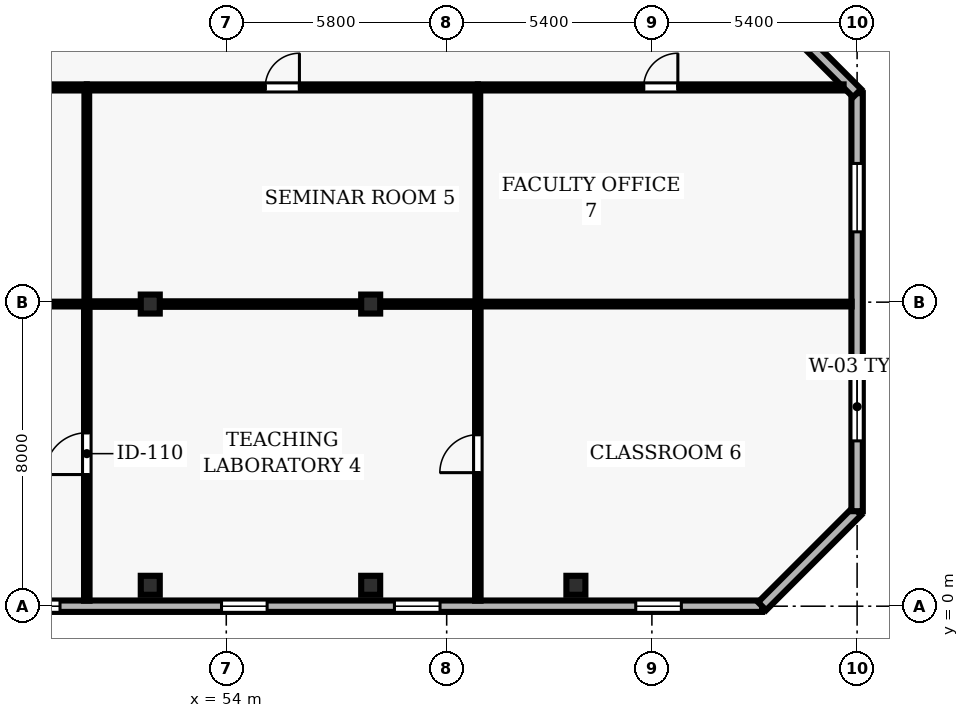
"""IFC4 building model, lengths in metres.
Left out: names, types, materials, properties, quantities, classifications, styles, units other than length and angle.
Written with IfcOpenShell. Run it as: python <this file> out.ifc"""

import sys

from ifc_helpers import new_model, si_unit, direction, frame, frame_2d, origin, origin_2d, place, context, subcontext, project, spatial, rectangle, hollow_rectangle, extrude, element, fill, save


model = new_model("IFC4")
c1 = context("Model", 3, precision=1e-05, world=origin(), true_north=direction((0.0, 1.0)))
c2 = subcontext(c1, "Body", "Model", "MODEL_VIEW")
j1 = project(units=[si_unit("LENGTHUNIT", "METRE"), si_unit("PLANEANGLEUNIT", "RADIAN")], contexts=[c1])
p1 = place(None, origin())
s1 = spatial("IfcSite", under=j1, at=p1, CompositionType="ELEMENT")
p2 = place(p1, origin())
s2 = spatial("IfcBuilding", under=s1, at=p2, CompositionType="ELEMENT")
p3 = place(p2, frame((0.0, 0.0, 103.4)))
s3 = spatial("IfcBuildingStorey", under=s2, at=p3, CompositionType="ELEMENT", Elevation=103.4)
for number, where, z_axis, x_axis in (
    (1, (52.0, 0.55, 0.0), (0.0, 0.0, 1.0), (1.0, 0.0, 0.0)),
    (2, (52.0, 7.95, 0.0), (0.0, 0.0, 1.0), (1.0, 0.0, 0.0)),
    (3, (57.8, 0.55, 0.0), (0.0, 0.0, 1.0), (1.0, 0.0, 0.0)),
    (4, (57.8, 7.95, 0.0), (0.0, 0.0, 1.0), (1.0, 0.0, 0.0)),
    (5, (63.2, 0.55, 0.0), (0.0, 0.0, 1.0), (1.0, 0.0, 0.0)),
):
    element("IfcColumn", number, at=place(p3, frame(where, z_axis=z_axis, x_axis=x_axis)), inside=s3, PredefinedType="COLUMN", context=c2, shape_type="SweptSolid", body=[
        extrude(hollow_rectangle(XDim=0.5, YDim=0.5, WallThickness=0.025, at=origin_2d()), origin(), (0.0, 0.0, 1.0), 3.9),
    ])
p4 = place(p3, frame((24.5, 0.0, 0.0), z_axis=(0.0, 0.0, 1.0), x_axis=(1.0, 0.0, 0.0)))
e6 = element("IfcWall", 6, at=p4, inside=s3, PredefinedType="SOLIDWALL", context=c2, shape_type="SweptSolid", body=[
    extrude(rectangle(XDim=43.6, YDim=0.3, at=frame_2d((21.8, 0.0))), origin(), (0.0, 0.0, 1.0), 3.69),
])
p5 = place(p4, frame((2.125, 0.0, 0.9)))
e7 = element("IfcOpeningElement", 7, at=p5, cuts=e6, PredefinedType="OPENING", context=c2, shape_type="SweptSolid", body=[
    extrude(rectangle(XDim=1.2, YDim=1.6, at=frame_2d((0.6, 0.8))), frame((0.0, 0.16, 0.0), z_axis=(0.0, -1.0, 0.0), x_axis=(1.0, 0.0, 0.0)), (0.0, 0.0, 1.0), 0.32),
])
p6 = place(p4, frame((8.475, 0.0, 0.9)))
e8 = element("IfcOpeningElement", 8, at=p6, cuts=e6, PredefinedType="OPENING", context=c2, shape_type="SweptSolid", body=[
    extrude(rectangle(XDim=1.2, YDim=1.6, at=frame_2d((0.6, 0.8))), frame((0.0, 0.16, 0.0), z_axis=(0.0, -1.0, 0.0), x_axis=(1.0, 0.0, 0.0)), (0.0, 0.0, 1.0), 0.32),
])
p7 = place(p4, frame((18.475, 0.0, 0.9)))
e9 = element("IfcOpeningElement", 9, at=p7, cuts=e6, PredefinedType="OPENING", context=c2, shape_type="SweptSolid", body=[
    extrude(rectangle(XDim=1.2, YDim=1.6, at=frame_2d((0.6, 0.8))), frame((0.0, 0.16, 0.0), z_axis=(0.0, -1.0, 0.0), x_axis=(1.0, 0.0, 0.0)), (0.0, 0.0, 1.0), 0.32),
])
p8 = place(p4, frame((23.925, 0.0, 0.9)))
e10 = element("IfcOpeningElement", 10, at=p8, cuts=e6, PredefinedType="OPENING", context=c2, shape_type="SweptSolid", body=[
    extrude(rectangle(XDim=1.2, YDim=1.6, at=frame_2d((0.6, 0.8))), frame((0.0, 0.16, 0.0), z_axis=(0.0, -1.0, 0.0), x_axis=(1.0, 0.0, 0.0)), (0.0, 0.0, 1.0), 0.32),
])
p9 = place(p4, frame((29.375, 0.0, 0.9)))
e11 = element("IfcOpeningElement", 11, at=p9, cuts=e6, PredefinedType="OPENING", context=c2, shape_type="SweptSolid", body=[
    extrude(rectangle(XDim=1.2, YDim=1.6, at=frame_2d((0.6, 0.8))), frame((0.0, 0.16, 0.0), z_axis=(0.0, -1.0, 0.0), x_axis=(1.0, 0.0, 0.0)), (0.0, 0.0, 1.0), 0.32),
])
p10 = place(p4, frame((33.925, 0.0, 0.9)))
e12 = element("IfcOpeningElement", 12, at=p10, cuts=e6, PredefinedType="OPENING", context=c2, shape_type="SweptSolid", body=[
    extrude(rectangle(XDim=1.2, YDim=1.6, at=frame_2d((0.6, 0.8))), frame((0.0, 0.16, 0.0), z_axis=(0.0, -1.0, 0.0), x_axis=(1.0, 0.0, 0.0)), (0.0, 0.0, 1.0), 0.32),
])
p11 = place(p4, frame((40.275, 0.0, 0.9)))
e13 = element("IfcOpeningElement", 13, at=p11, cuts=e6, PredefinedType="OPENING", context=c2, shape_type="SweptSolid", body=[
    extrude(rectangle(XDim=1.2, YDim=1.6, at=frame_2d((0.6, 0.8))), frame((0.0, 0.16, 0.0), z_axis=(0.0, -1.0, 0.0), x_axis=(1.0, 0.0, 0.0)), (0.0, 0.0, 1.0), 0.32),
])
p12 = place(p3, frame((68.1, 0.0, 0.0), z_axis=(0.0, 0.0, 1.0), x_axis=(0.707106781187, 0.707106781187, 0.0)))
e14 = element("IfcWall", 14, at=p12, inside=s3, PredefinedType="SOLIDWALL", context=c2, shape_type="SweptSolid", body=[
    extrude(rectangle(XDim=3.536, YDim=0.3, at=frame_2d((1.768, 0.0))), origin(), (0.0, 0.0, 1.0), 3.69),
])
p13 = place(p3, frame((70.6, 2.5, 0.0), z_axis=(0.0, 0.0, 1.0), x_axis=(0.0, 1.0, 0.0)))
e15 = element("IfcWall", 15, at=p13, inside=s3, PredefinedType="SOLIDWALL", context=c2, shape_type="SweptSolid", body=[
    extrude(rectangle(XDim=11.0, YDim=0.3, at=frame_2d((5.5, 0.0))), origin(), (0.0, 0.0, 1.0), 3.69),
])
p14 = place(p13, frame((1.85, 0.0, 0.9)))
e16 = element("IfcOpeningElement", 16, at=p14, cuts=e15, PredefinedType="OPENING", context=c2, shape_type="SweptSolid", body=[
    extrude(rectangle(XDim=1.8, YDim=1.6, at=frame_2d((0.9, 0.8))), frame((0.0, 0.16, 0.0), z_axis=(0.0, -1.0, 0.0), x_axis=(1.0, 0.0, 0.0)), (0.0, 0.0, 1.0), 0.32),
])
p15 = place(p13, frame((7.35, 0.0, 0.9)))
e17 = element("IfcOpeningElement", 17, at=p15, cuts=e15, PredefinedType="OPENING", context=c2, shape_type="SweptSolid", body=[
    extrude(rectangle(XDim=1.8, YDim=1.6, at=frame_2d((0.9, 0.8))), frame((0.0, 0.16, 0.0), z_axis=(0.0, -1.0, 0.0), x_axis=(1.0, 0.0, 0.0)), (0.0, 0.0, 1.0), 0.32),
])
p16 = place(p3, frame((70.6, 13.5, 0.0), z_axis=(0.0, 0.0, 1.0), x_axis=(-0.707106781187, 0.707106781187, 0.0)))
e18 = element("IfcWall", 18, at=p16, inside=s3, PredefinedType="SOLIDWALL", context=c2, shape_type="SweptSolid", body=[
    extrude(rectangle(XDim=3.536, YDim=0.3, at=frame_2d((1.768, 0.0))), origin(), (0.0, 0.0, 1.0), 3.69),
])
p17 = place(p3, frame((40.35, 13.65, 0.0), z_axis=(0.0, 0.0, 1.0), x_axis=(1.0, 0.0, 0.0)))
e19 = element("IfcWall", 19, at=p17, inside=s3, PredefinedType="PARTITIONING", context=c2, shape_type="SweptSolid", body=[
    extrude(rectangle(XDim=9.98, YDim=0.16, at=frame_2d((4.99, 0.0))), origin(), (0.0, 0.0, 1.0), 3.69),
])
p18 = place(p17, frame((3.79, 0.0, 0.0)))
e20 = element("IfcOpeningElement", 20, at=p18, cuts=e19, PredefinedType="OPENING", context=c2, shape_type="SweptSolid", body=[
    extrude(rectangle(XDim=1.0, YDim=2.1, at=frame_2d((0.5, 1.05))), frame((0.0, 0.09, 0.0), z_axis=(0.0, -1.0, 0.0), x_axis=(1.0, 0.0, 0.0)), (0.0, 0.0, 1.0), 0.18),
])
p19 = place(p3, frame((50.33, 7.95, 0.0), z_axis=(0.0, 0.0, 1.0), x_axis=(-1.0, 0.0, 0.0)))
e21 = element("IfcWall", 21, at=p19, inside=s3, PredefinedType="PARTITIONING", context=c2, shape_type="SweptSolid", body=[
    extrude(rectangle(XDim=9.98, YDim=0.125, at=frame_2d((4.99, 0.0))), origin(), (0.0, 0.0, 1.0), 3.074),
])
p20 = place(p3, frame((50.33, 13.65, 0.0), z_axis=(0.0, 0.0, 1.0), x_axis=(1.0, 0.0, 0.0)))
e22 = element("IfcWall", 22, at=p20, inside=s3, PredefinedType="PARTITIONING", context=c2, shape_type="SweptSolid", body=[
    extrude(rectangle(XDim=10.29, YDim=0.16, at=frame_2d((5.145, 0.0))), origin(), (0.0, 0.0, 1.0), 3.69),
])
p21 = place(p20, frame((4.695, 0.0, 0.0)))
e23 = element("IfcOpeningElement", 23, at=p21, cuts=e22, PredefinedType="OPENING", context=c2, shape_type="SweptSolid", body=[
    extrude(rectangle(XDim=0.9, YDim=2.1, at=frame_2d((0.45, 1.05))), frame((0.0, 0.09, 0.0), z_axis=(0.0, -1.0, 0.0), x_axis=(1.0, 0.0, 0.0)), (0.0, 0.0, 1.0), 0.18),
])
p22 = place(p3, frame((60.62, 7.95, 0.0), z_axis=(0.0, 0.0, 1.0), x_axis=(-1.0, 0.0, 0.0)))
e24 = element("IfcWall", 24, at=p22, inside=s3, PredefinedType="PARTITIONING", context=c2, shape_type="SweptSolid", body=[
    extrude(rectangle(XDim=10.29, YDim=0.145, at=frame_2d((5.145, 0.0))), origin(), (0.0, 0.0, 1.0), 3.074),
])
p23 = place(p3, frame((60.62, 13.65, 0.0), z_axis=(0.0, 0.0, 1.0), x_axis=(1.0, 0.0, 0.0)))
e25 = element("IfcWall", 25, at=p23, inside=s3, PredefinedType="PARTITIONING", context=c2, shape_type="SweptSolid", body=[
    extrude(rectangle(XDim=9.625, YDim=0.16, at=frame_2d((4.812, 0.0))), origin(), (0.0, 0.0, 1.0), 3.69),
])
p24 = place(p23, frame((4.363, 0.0, 0.0)))
e26 = element("IfcOpeningElement", 26, at=p24, cuts=e25, PredefinedType="OPENING", context=c2, shape_type="SweptSolid", body=[
    extrude(rectangle(XDim=0.9, YDim=2.1, at=frame_2d((0.45, 1.05))), frame((0.0, 0.09, 0.0), z_axis=(0.0, -1.0, 0.0), x_axis=(1.0, 0.0, 0.0)), (0.0, 0.0, 1.0), 0.18),
])
p25 = place(p3, frame((70.455, 7.95, 0.0), z_axis=(0.0, 0.0, 1.0), x_axis=(-1.0, 0.0, 0.0)))
e27 = element("IfcWall", 27, at=p25, inside=s3, PredefinedType="PARTITIONING", context=c2, shape_type="SweptSolid", body=[
    extrude(rectangle(XDim=9.835, YDim=0.125, at=frame_2d((4.917, 0.0))), origin(), (0.0, 0.0, 1.0), 3.69),
])
p26 = place(p3, frame((50.33, 0.145, 0.0), z_axis=(0.0, 0.0, 1.0), x_axis=(0.0, 1.0, 0.0)))
e28 = element("IfcWall", 28, at=p26, inside=s3, PredefinedType="PARTITIONING", context=c2, shape_type="SweptSolid", body=[
    extrude(rectangle(XDim=7.738, YDim=0.145, at=frame_2d((3.869, 0.0))), origin(), (0.0, 0.0, 1.0), 3.69),
])
p27 = place(p26, frame((3.319, 0.0, 0.0)))
e29 = element("IfcOpeningElement", 29, at=p27, cuts=e28, PredefinedType="OPENING", context=c2, shape_type="SweptSolid", body=[
    extrude(rectangle(XDim=1.1, YDim=2.15, at=frame_2d((0.55, 1.075))), frame((0.0, 0.083, 0.0), z_axis=(0.0, -1.0, 0.0), x_axis=(1.0, 0.0, 0.0)), (0.0, 0.0, 1.0), 0.165),
])
p28 = place(p3, frame((50.33, 8.018, 0.0), z_axis=(0.0, 0.0, 1.0), x_axis=(0.0, 1.0, 0.0)))
e30 = element("IfcWall", 30, at=p28, inside=s3, PredefinedType="PARTITIONING", context=c2, shape_type="SweptSolid", body=[
    extrude(rectangle(XDim=5.557, YDim=0.125, at=frame_2d((2.778, 0.0))), origin(), (0.0, 0.0, 1.0), 3.69),
])
p29 = place(p3, frame((60.62, 0.145, 0.0), z_axis=(0.0, 0.0, 1.0), x_axis=(0.0, 1.0, 0.0)))
e31 = element("IfcWall", 31, at=p29, inside=s3, PredefinedType="PARTITIONING", context=c2, shape_type="SweptSolid", body=[
    extrude(rectangle(XDim=7.738, YDim=0.145, at=frame_2d((3.869, 0.0))), origin(), (0.0, 0.0, 1.0), 3.69),
])
p30 = place(p29, frame((3.369, 0.0, 0.0)))
e32 = element("IfcOpeningElement", 32, at=p30, cuts=e31, PredefinedType="OPENING", context=c2, shape_type="SweptSolid", body=[
    extrude(rectangle(XDim=1.0, YDim=2.1, at=frame_2d((0.5, 1.05))), frame((0.0, 0.083, 0.0), z_axis=(0.0, -1.0, 0.0), x_axis=(1.0, 0.0, 0.0)), (0.0, 0.0, 1.0), 0.165),
])
p31 = place(p3, frame((60.62, 8.018, 0.0), z_axis=(0.0, 0.0, 1.0), x_axis=(0.0, 1.0, 0.0)))
e33 = element("IfcWall", 33, at=p31, inside=s3, PredefinedType="PARTITIONING", context=c2, shape_type="SweptSolid", body=[
    extrude(rectangle(XDim=5.557, YDim=0.125, at=frame_2d((2.778, 0.0))), origin(), (0.0, 0.0, 1.0), 3.69),
])
p32 = place(p8, origin())
e34 = element("IfcWindow", 34, at=p32, inside=s3, PartitioningType="SINGLE_PANEL", PredefinedType="WINDOW", context=c2, shape_type="SweptSolid", body=[
    extrude(rectangle(XDim=1.2, YDim=1.6, at=frame_2d((0.6, 0.8))), frame((0.0, 0.03, 0.0), z_axis=(0.0, -1.0, 0.0), x_axis=(1.0, 0.0, 0.0)), (0.0, 0.0, 1.0), 0.06),
])
fill(e10, e34)
p33 = place(p9, origin())
e35 = element("IfcWindow", 35, at=p33, inside=s3, PartitioningType="SINGLE_PANEL", PredefinedType="WINDOW", context=c2, shape_type="SweptSolid", body=[
    extrude(rectangle(XDim=1.2, YDim=1.6, at=frame_2d((0.6, 0.8))), frame((0.0, 0.03, 0.0), z_axis=(0.0, -1.0, 0.0), x_axis=(1.0, 0.0, 0.0)), (0.0, 0.0, 1.0), 0.06),
])
fill(e11, e35)
p34 = place(p10, origin())
e36 = element("IfcWindow", 36, at=p34, inside=s3, PartitioningType="SINGLE_PANEL", PredefinedType="WINDOW", context=c2, shape_type="SweptSolid", body=[
    extrude(rectangle(XDim=1.2, YDim=1.6, at=frame_2d((0.6, 0.8))), frame((0.0, 0.03, 0.0), z_axis=(0.0, -1.0, 0.0), x_axis=(1.0, 0.0, 0.0)), (0.0, 0.0, 1.0), 0.06),
])
fill(e12, e36)
p35 = place(p11, origin())
e37 = element("IfcWindow", 37, at=p35, inside=s3, PartitioningType="SINGLE_PANEL", PredefinedType="WINDOW", context=c2, shape_type="SweptSolid", body=[
    extrude(rectangle(XDim=1.2, YDim=1.6, at=frame_2d((0.6, 0.8))), frame((0.0, 0.03, 0.0), z_axis=(0.0, -1.0, 0.0), x_axis=(1.0, 0.0, 0.0)), (0.0, 0.0, 1.0), 0.06),
])
fill(e13, e37)
p36 = place(p14, origin())
e38 = element("IfcWindow", 38, at=p36, inside=s3, PartitioningType="SINGLE_PANEL", PredefinedType="WINDOW", context=c2, shape_type="SweptSolid", body=[
    extrude(rectangle(XDim=1.8, YDim=1.6, at=frame_2d((0.9, 0.8))), frame((0.0, 0.03, 0.0), z_axis=(0.0, -1.0, 0.0), x_axis=(1.0, 0.0, 0.0)), (0.0, 0.0, 1.0), 0.06),
])
fill(e16, e38)
p37 = place(p15, origin())
e39 = element("IfcWindow", 39, at=p37, inside=s3, PartitioningType="SINGLE_PANEL", PredefinedType="WINDOW", context=c2, shape_type="SweptSolid", body=[
    extrude(rectangle(XDim=1.8, YDim=1.6, at=frame_2d((0.9, 0.8))), frame((0.0, 0.03, 0.0), z_axis=(0.0, -1.0, 0.0), x_axis=(1.0, 0.0, 0.0)), (0.0, 0.0, 1.0), 0.06),
])
fill(e17, e39)
p38 = place(p27, origin())
e40 = element("IfcDoor", 40, at=p38, inside=s3, OperationType="SINGLE_SWING_LEFT", PredefinedType="DOOR", context=c2, shape_type="SweptSolid", body=[
    extrude(rectangle(XDim=1.1, YDim=2.15, at=frame_2d((0.55, 1.075))), frame((0.0, 0.025, 0.0), z_axis=(0.0, -1.0, 0.0), x_axis=(1.0, 0.0, 0.0)), (0.0, 0.0, 1.0), 0.05),
])
fill(e29, e40)
p39 = place(p21, origin())
e41 = element("IfcDoor", 41, at=p39, inside=s3, OperationType="SINGLE_SWING_RIGHT", PredefinedType="DOOR", context=c2, shape_type="SweptSolid", body=[
    extrude(rectangle(XDim=0.9, YDim=2.1, at=frame_2d((0.45, 1.05))), frame((0.0, 0.025, 0.0), z_axis=(0.0, -1.0, 0.0), x_axis=(1.0, 0.0, 0.0)), (0.0, 0.0, 1.0), 0.05),
])
fill(e23, e41)
p40 = place(p30, origin())
e42 = element("IfcDoor", 42, at=p40, inside=s3, OperationType="SINGLE_SWING_LEFT", PredefinedType="DOOR", context=c2, shape_type="SweptSolid", body=[
    extrude(rectangle(XDim=1.0, YDim=2.1, at=frame_2d((0.5, 1.05))), frame((0.0, 0.025, 0.0), z_axis=(0.0, -1.0, 0.0), x_axis=(1.0, 0.0, 0.0)), (0.0, 0.0, 1.0), 0.05),
])
fill(e32, e42)
p41 = place(p24, origin())
e43 = element("IfcDoor", 43, at=p41, inside=s3, OperationType="SINGLE_SWING_RIGHT", PredefinedType="DOOR", context=c2, shape_type="SweptSolid", body=[
    extrude(rectangle(XDim=0.9, YDim=2.1, at=frame_2d((0.45, 1.05))), frame((0.0, 0.025, 0.0), z_axis=(0.0, -1.0, 0.0), x_axis=(1.0, 0.0, 0.0)), (0.0, 0.0, 1.0), 0.05),
])
fill(e26, e43)
save(model, sys.argv[1])
